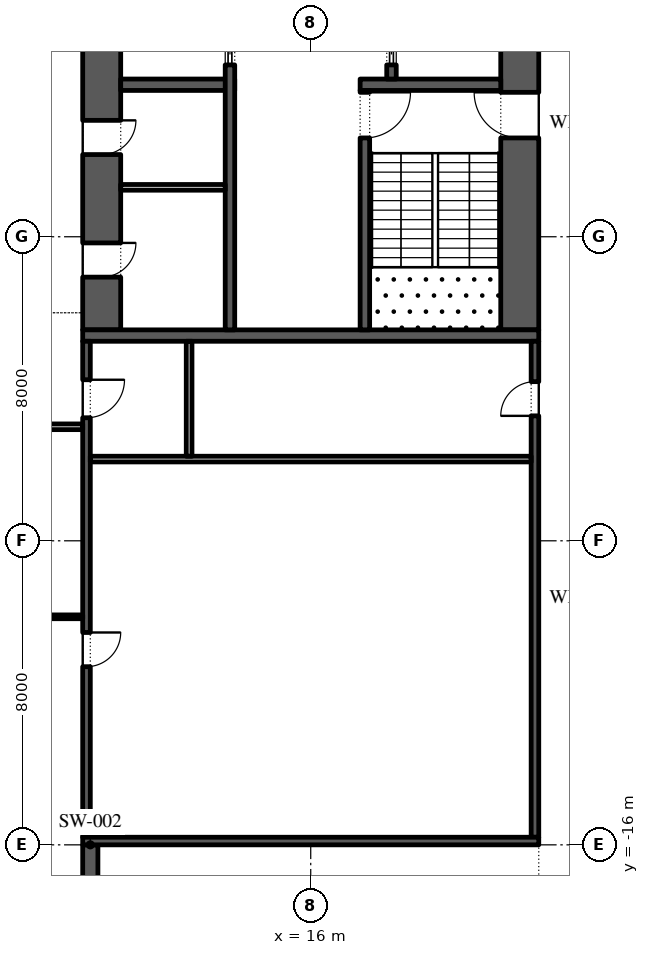
"""IFC4 building model, lengths in metres.
Left out: names, types, materials, properties, quantities, classifications, styles, units other than length and angle.
Written with IfcOpenShell. Run it as: python <this file> out.ifc"""

import sys

from ifc_helpers import new_model, si_unit, direction, frame, frame_2d, origin, place, context, subcontext, project, spatial, rectangle, extrude, element, fill, save


model = new_model("IFC4")
c1 = context("Model", 3, precision=1e-05, world=origin(), true_north=direction((0.0, 1.0)))
c2 = subcontext(c1, "Body", "Model", "MODEL_VIEW")
j1 = project(units=[si_unit("LENGTHUNIT", "METRE"), si_unit("PLANEANGLEUNIT", "RADIAN")], contexts=[c1])
p1 = place(None, origin())
s1 = spatial("IfcSite", under=j1, at=p1, CompositionType="ELEMENT")
p2 = place(p1, origin())
s2 = spatial("IfcBuilding", under=s1, at=p2, CompositionType="ELEMENT")
p3 = place(p2, frame((0.0, 0.0, 19.2)))
s3 = spatial("IfcBuildingStorey", under=s2, at=p3, CompositionType="ELEMENT", Elevation=19.2)
p4 = place(p3, frame((10.2, -31.0, 0.0), z_axis=(0.0, 0.0, 1.0), x_axis=(0.0, 1.0, 0.0)))
e1 = element("IfcWall", 1, at=p4, inside=s3, PredefinedType="SHEAR", context=c2, shape_type="SweptSolid", body=[
    extrude(rectangle(XDim=15.0, YDim=0.4, at=frame_2d((7.5, 0.0))), origin(), (0.0, 0.0, 1.0), 4.5),
])
p5 = place(p3, frame((21.5, -2.45, 0.0), z_axis=(0.0, 0.0, 1.0), x_axis=(0.0, 1.0, 0.0)))
e2 = element("IfcWall", 2, at=p5, inside=s3, PredefinedType="SHEAR", context=c2, shape_type="SweptSolid", body=[
    extrude(rectangle(XDim=27.9, YDim=1.0, at=frame_2d((13.95, 0.0))), origin(), (0.0, 0.0, 1.0), 4.5),
])
p6 = place(p5, frame((5.05, 0.0, 0.0)))
e3 = element("IfcOpeningElement", 3, at=p6, cuts=e2, PredefinedType="OPENING", context=c2, shape_type="SweptSolid", body=[
    extrude(rectangle(XDim=1.2, YDim=2.1, at=frame_2d((0.6, 1.05))), frame((0.0, 0.51, 0.0), z_axis=(0.0, -1.0, 0.0), x_axis=(1.0, 0.0, 0.0)), (0.0, 0.0, 1.0), 1.02),
])
p7 = place(p5, frame((21.65, 0.0, 0.0)))
e4 = element("IfcOpeningElement", 4, at=p7, cuts=e2, PredefinedType="OPENING", context=c2, shape_type="SweptSolid", body=[
    extrude(rectangle(XDim=1.2, YDim=2.1, at=frame_2d((0.6, 1.05))), frame((0.0, 0.51, 0.0), z_axis=(0.0, -1.0, 0.0), x_axis=(1.0, 0.0, 0.0)), (0.0, 0.0, 1.0), 1.02),
])
p8 = place(p3, frame((10.5, -2.45, 0.0), z_axis=(0.0, 0.0, 1.0), x_axis=(0.0, 1.0, 0.0)))
e5 = element("IfcWall", 5, at=p8, inside=s3, PredefinedType="SHEAR", context=c2, shape_type="SweptSolid", body=[
    extrude(rectangle(XDim=27.9, YDim=1.0, at=frame_2d((13.95, 0.0))), origin(), (0.0, 0.0, 1.0), 4.5),
])
p9 = place(p8, frame((23.65, 0.0, 0.0)))
e6 = element("IfcOpeningElement", 6, at=p9, cuts=e5, PredefinedType="OPENING", context=c2, shape_type="SweptSolid", body=[
    extrude(rectangle(XDim=2.4, YDim=2.1, at=frame_2d((1.2, 1.05))), frame((0.0, 0.51, 0.0), z_axis=(0.0, -1.0, 0.0), x_axis=(1.0, 0.0, 0.0)), (0.0, 0.0, 1.0), 1.02),
])
p10 = place(p8, frame((1.387, 0.0, 0.0)))
e7 = element("IfcOpeningElement", 7, at=p10, cuts=e5, PredefinedType="OPENING", context=c2, shape_type="SweptSolid", body=[
    extrude(rectangle(XDim=0.9, YDim=2.1, at=frame_2d((0.45, 1.05))), frame((0.0, 0.51, 0.0), z_axis=(0.0, -1.0, 0.0), x_axis=(1.0, 0.0, 0.0)), (0.0, 0.0, 1.0), 1.02),
])
p11 = place(p8, frame((4.613, 0.0, 0.0)))
e8 = element("IfcOpeningElement", 8, at=p11, cuts=e5, PredefinedType="OPENING", context=c2, shape_type="SweptSolid", body=[
    extrude(rectangle(XDim=0.9, YDim=2.1, at=frame_2d((0.45, 1.05))), frame((0.0, 0.51, 0.0), z_axis=(0.0, -1.0, 0.0), x_axis=(1.0, 0.0, 0.0)), (0.0, 0.0, 1.0), 1.02),
])
p12 = place(p3, frame((10.0, -2.6, 0.0), z_axis=(0.0, 0.0, 1.0), x_axis=(1.0, 0.0, 0.0)))
e9 = element("IfcWall", 9, at=p12, inside=s3, PredefinedType="SHEAR", context=c2, shape_type="SweptSolid", body=[
    extrude(rectangle(XDim=12.0, YDim=0.3, at=frame_2d((6.0, 0.0))), origin(), (0.0, 0.0, 1.0), 4.5),
])
p13 = place(p3, frame((17.3, 4.0, 0.0), z_axis=(0.0, 0.0, 1.0), x_axis=(1.0, 0.0, 0.0)))
e10 = element("IfcWall", 10, at=p13, inside=s3, PredefinedType="SHEAR", context=c2, shape_type="SweptSolid", body=[
    extrude(rectangle(XDim=3.7, YDim=0.3, at=frame_2d((1.85, 0.0))), origin(), (0.0, 0.0, 1.0), 4.5),
])
p14 = place(p3, frame((17.425, -2.45, 0.0), z_axis=(0.0, 0.0, 1.0), x_axis=(0.0, 1.0, 0.0)))
e11 = element("IfcWall", 11, at=p14, inside=s3, PredefinedType="SHEAR", context=c2, shape_type="SweptSolid", body=[
    extrude(rectangle(XDim=6.3, YDim=0.25, at=frame_2d((3.15, 0.0))), origin(), (0.0, 0.0, 1.0), 4.5),
])
p15 = place(p14, frame((5.05, 0.0, 0.0)))
e12 = element("IfcOpeningElement", 12, at=p15, cuts=e11, PredefinedType="OPENING", context=c2, shape_type="SweptSolid", body=[
    extrude(rectangle(XDim=1.2, YDim=2.1, at=frame_2d((0.6, 1.05))), frame((0.0, 0.135, 0.0), z_axis=(0.0, -1.0, 0.0), x_axis=(1.0, 0.0, 0.0)), (0.0, 0.0, 1.0), 0.27),
])
p16 = place(p3, frame((18.125, 4.15, 0.0), z_axis=(0.0, 0.0, 1.0), x_axis=(0.0, 1.0, 0.0)))
e13 = element("IfcWall", 13, at=p16, inside=s3, PredefinedType="SHEAR", context=c2, shape_type="SweptSolid", body=[
    extrude(rectangle(XDim=14.7, YDim=0.25, at=frame_2d((7.35, 0.0))), origin(), (0.0, 0.0, 1.0), 4.5),
])
p17 = place(p16, frame((0.371, 0.0, 0.0)))
e14 = element("IfcOpeningElement", 14, at=p17, cuts=e13, PredefinedType="OPENING", context=c2, shape_type="SweptSolid", body=[
    extrude(rectangle(XDim=1.1, YDim=2.1, at=frame_2d((0.55, 1.05))), frame((0.0, 0.135, 0.0), z_axis=(0.0, -1.0, 0.0), x_axis=(1.0, 0.0, 0.0)), (0.0, 0.0, 1.0), 0.27),
])
p18 = place(p16, frame((2.514, 0.0, 0.0)))
e15 = element("IfcOpeningElement", 15, at=p18, cuts=e13, PredefinedType="OPENING", context=c2, shape_type="SweptSolid", body=[
    extrude(rectangle(XDim=1.1, YDim=2.1, at=frame_2d((0.55, 1.05))), frame((0.0, 0.135, 0.0), z_axis=(0.0, -1.0, 0.0), x_axis=(1.0, 0.0, 0.0)), (0.0, 0.0, 1.0), 0.27),
])
p19 = place(p16, frame((4.657, 0.0, 0.0)))
e16 = element("IfcOpeningElement", 16, at=p19, cuts=e13, PredefinedType="OPENING", context=c2, shape_type="SweptSolid", body=[
    extrude(rectangle(XDim=1.1, YDim=2.1, at=frame_2d((0.55, 1.05))), frame((0.0, 0.135, 0.0), z_axis=(0.0, -1.0, 0.0), x_axis=(1.0, 0.0, 0.0)), (0.0, 0.0, 1.0), 0.27),
])
p20 = place(p16, frame((6.8, 0.0, 0.0)))
e17 = element("IfcOpeningElement", 17, at=p20, cuts=e13, PredefinedType="OPENING", context=c2, shape_type="SweptSolid", body=[
    extrude(rectangle(XDim=1.1, YDim=2.1, at=frame_2d((0.55, 1.05))), frame((0.0, 0.135, 0.0), z_axis=(0.0, -1.0, 0.0), x_axis=(1.0, 0.0, 0.0)), (0.0, 0.0, 1.0), 0.27),
])
p21 = place(p16, frame((8.943, 0.0, 0.0)))
e18 = element("IfcOpeningElement", 18, at=p21, cuts=e13, PredefinedType="OPENING", context=c2, shape_type="SweptSolid", body=[
    extrude(rectangle(XDim=1.1, YDim=2.1, at=frame_2d((0.55, 1.05))), frame((0.0, 0.135, 0.0), z_axis=(0.0, -1.0, 0.0), x_axis=(1.0, 0.0, 0.0)), (0.0, 0.0, 1.0), 0.27),
])
p22 = place(p16, frame((11.086, 0.0, 0.0)))
e19 = element("IfcOpeningElement", 19, at=p22, cuts=e13, PredefinedType="OPENING", context=c2, shape_type="SweptSolid", body=[
    extrude(rectangle(XDim=1.1, YDim=2.1, at=frame_2d((0.55, 1.05))), frame((0.0, 0.135, 0.0), z_axis=(0.0, -1.0, 0.0), x_axis=(1.0, 0.0, 0.0)), (0.0, 0.0, 1.0), 0.27),
])
p23 = place(p16, frame((13.229, 0.0, 0.0)))
e20 = element("IfcOpeningElement", 20, at=p23, cuts=e13, PredefinedType="OPENING", context=c2, shape_type="SweptSolid", body=[
    extrude(rectangle(XDim=1.1, YDim=2.1, at=frame_2d((0.55, 1.05))), frame((0.0, 0.135, 0.0), z_axis=(0.0, -1.0, 0.0), x_axis=(1.0, 0.0, 0.0)), (0.0, 0.0, 1.0), 0.27),
])
p24 = place(p3, frame((11.0, 4.0, 0.0), z_axis=(0.0, 0.0, 1.0), x_axis=(1.0, 0.0, 0.0)))
e21 = element("IfcWall", 21, at=p24, inside=s3, PredefinedType="SHEAR", context=c2, shape_type="SweptSolid", body=[
    extrude(rectangle(XDim=3.0, YDim=0.3, at=frame_2d((1.5, 0.0))), origin(), (0.0, 0.0, 1.0), 4.5),
])
p25 = place(p3, frame((13.875, -2.45, 0.0), z_axis=(0.0, 0.0, 1.0), x_axis=(0.0, 1.0, 0.0)))
e22 = element("IfcWall", 22, at=p25, inside=s3, PredefinedType="SHEAR", context=c2, shape_type="SweptSolid", body=[
    extrude(rectangle(XDim=21.3, YDim=0.25, at=frame_2d((10.65, 0.0))), origin(), (0.0, 0.0, 1.0), 4.5),
])
p26 = place(p25, frame((11.446, 0.0, 0.0)))
e23 = element("IfcOpeningElement", 23, at=p26, cuts=e22, PredefinedType="OPENING", context=c2, shape_type="SweptSolid", body=[
    extrude(rectangle(XDim=0.9, YDim=2.1, at=frame_2d((0.45, 1.05))), frame((0.0, 0.135, 0.0), z_axis=(0.0, -1.0, 0.0), x_axis=(1.0, 0.0, 0.0)), (0.0, 0.0, 1.0), 0.27),
])
p27 = place(p25, frame((17.725, 0.0, 0.0)))
e24 = element("IfcOpeningElement", 24, at=p27, cuts=e22, PredefinedType="OPENING", context=c2, shape_type="SweptSolid", body=[
    extrude(rectangle(XDim=0.9, YDim=2.1, at=frame_2d((0.45, 1.05))), frame((0.0, 0.135, 0.0), z_axis=(0.0, -1.0, 0.0), x_axis=(1.0, 0.0, 0.0)), (0.0, 0.0, 1.0), 0.27),
])
p28 = place(p25, frame((6.971, 0.0, 0.0)))
e25 = element("IfcOpeningElement", 25, at=p28, cuts=e22, PredefinedType="OPENING", context=c2, shape_type="SweptSolid", body=[
    extrude(rectangle(XDim=1.1, YDim=2.1, at=frame_2d((0.55, 1.05))), frame((0.0, 0.135, 0.0), z_axis=(0.0, -1.0, 0.0), x_axis=(1.0, 0.0, 0.0)), (0.0, 0.0, 1.0), 0.27),
])
p29 = place(p3, frame((11.0, 1.3, 0.0), z_axis=(0.0, 0.0, 1.0), x_axis=(1.0, 0.0, 0.0)))
e26 = element("IfcWall", 26, at=p29, inside=s3, PredefinedType="PARTITIONING", context=c2, shape_type="SweptSolid", body=[
    extrude(rectangle(XDim=2.75, YDim=0.15, at=frame_2d((1.375, 0.0))), origin(), (0.0, 0.0, 1.0), 4.5),
])
p30 = place(p3, frame((21.9, -15.8, 0.0), z_axis=(0.0, 0.0, 1.0), x_axis=(0.0, 1.0, 0.0)))
e27 = element("IfcWall", 27, at=p30, inside=s3, PredefinedType="SHEAR", context=c2, shape_type="SweptSolid", body=[
    extrude(rectangle(XDim=13.05, YDim=0.2, at=frame_2d((6.525, 0.0))), origin(), (0.0, 0.0, 1.0), 4.5),
])
p31 = place(p30, frame((11.087, 0.0, 0.0)))
e28 = element("IfcOpeningElement", 28, at=p31, cuts=e27, PredefinedType="OPENING", context=c2, shape_type="SweptSolid", body=[
    extrude(rectangle(XDim=0.9, YDim=2.1, at=frame_2d((0.45, 1.05))), frame((0.0, 0.11, 0.0), z_axis=(0.0, -1.0, 0.0), x_axis=(1.0, 0.0, 0.0)), (0.0, 0.0, 1.0), 0.22),
])
p32 = place(p3, frame((10.1, -15.8, 0.0), z_axis=(0.0, 0.0, 1.0), x_axis=(0.0, 1.0, 0.0)))
e29 = element("IfcWall", 29, at=p32, inside=s3, PredefinedType="SHEAR", context=c2, shape_type="SweptSolid", body=[
    extrude(rectangle(XDim=13.05, YDim=0.2, at=frame_2d((6.525, 0.0))), origin(), (0.0, 0.0, 1.0), 4.5),
])
p33 = place(p32, frame((4.488, 0.0, 0.0)))
e30 = element("IfcOpeningElement", 30, at=p33, cuts=e29, PredefinedType="OPENING", context=c2, shape_type="SweptSolid", body=[
    extrude(rectangle(XDim=0.9, YDim=2.1, at=frame_2d((0.45, 1.05))), frame((0.0, 0.11, 0.0), z_axis=(0.0, -1.0, 0.0), x_axis=(1.0, 0.0, 0.0)), (0.0, 0.0, 1.0), 0.22),
])
p34 = place(p32, frame((11.038, 0.0, 0.0)))
e31 = element("IfcOpeningElement", 31, at=p34, cuts=e29, PredefinedType="OPENING", context=c2, shape_type="SweptSolid", body=[
    extrude(rectangle(XDim=1.0, YDim=2.1, at=frame_2d((0.5, 1.05))), frame((0.0, 0.11, 0.0), z_axis=(0.0, -1.0, 0.0), x_axis=(1.0, 0.0, 0.0)), (0.0, 0.0, 1.0), 0.22),
])
p35 = place(p3, frame((10.0, -15.9, 0.0), z_axis=(0.0, 0.0, 1.0), x_axis=(1.0, 0.0, 0.0)))
e32 = element("IfcWall", 32, at=p35, inside=s3, PredefinedType="SHEAR", context=c2, shape_type="SweptSolid", body=[
    extrude(rectangle(XDim=12.0, YDim=0.2, at=frame_2d((6.0, 0.0))), origin(), (0.0, 0.0, 1.0), 4.5),
])
p36 = place(p3, frame((10.2, -5.85, 0.0), z_axis=(0.0, 0.0, 1.0), x_axis=(1.0, 0.0, 0.0)))
e33 = element("IfcWall", 33, at=p36, inside=s3, PredefinedType="PARTITIONING", context=c2, shape_type="SweptSolid", body=[
    extrude(rectangle(XDim=11.6, YDim=0.15, at=frame_2d((5.8, 0.0))), origin(), (0.0, 0.0, 1.0), 4.5),
])
p37 = place(p3, frame((12.8, -5.775, 0.0), z_axis=(0.0, 0.0, 1.0), x_axis=(0.0, 1.0, 0.0)))
e34 = element("IfcWall", 34, at=p37, inside=s3, PredefinedType="PARTITIONING", context=c2, shape_type="SweptSolid", body=[
    extrude(rectangle(XDim=3.025, YDim=0.15, at=frame_2d((1.512, 0.0))), origin(), (0.0, 0.0, 1.0), 4.5),
])
p38 = place(p3, frame((2.075, -10.0, 0.0), z_axis=(0.0, 0.0, 1.0), x_axis=(1.0, 0.0, 0.0)))
e35 = element("IfcWall", 35, at=p38, inside=s3, PredefinedType="PARTITIONING", context=c2, shape_type="SweptSolid", body=[
    extrude(rectangle(XDim=7.925, YDim=0.1, at=frame_2d((3.962, 0.0))), origin(), (0.0, 0.0, 1.0), 4.5),
])
p39 = place(p3, frame((2.075, -5.0, 0.0), z_axis=(0.0, 0.0, 1.0), x_axis=(1.0, 0.0, 0.0)))
e36 = element("IfcWall", 36, at=p39, inside=s3, PredefinedType="PARTITIONING", context=c2, shape_type="SweptSolid", body=[
    extrude(rectangle(XDim=7.925, YDim=0.15, at=frame_2d((3.962, 0.0))), origin(), (0.0, 0.0, 1.0), 4.5),
])
p40 = place(p39, frame((3.462, 0.0, 0.0)))
e37 = element("IfcOpeningElement", 37, at=p40, cuts=e36, PredefinedType="OPENING", context=c2, shape_type="SweptSolid", body=[
    extrude(rectangle(XDim=1.0, YDim=2.1, at=frame_2d((0.5, 1.05))), frame((0.0, 0.085, 0.0), z_axis=(0.0, -1.0, 0.0), x_axis=(1.0, 0.0, 0.0)), (0.0, 0.0, 1.0), 0.17),
])
p41 = place(p17, origin())
e38 = element("IfcDoor", 38, at=p41, inside=s3, OperationType="SLIDING_TO_LEFT", PredefinedType="DOOR", context=c2, shape_type="SweptSolid", body=[
    extrude(rectangle(XDim=1.1, YDim=2.1, at=frame_2d((0.55, 1.05))), frame((0.0, 0.025, 0.0), z_axis=(0.0, -1.0, 0.0), x_axis=(1.0, 0.0, 0.0)), (0.0, 0.0, 1.0), 0.05),
])
fill(e14, e38)
p42 = place(p28, origin())
e39 = element("IfcDoor", 39, at=p42, inside=s3, OperationType="SLIDING_TO_LEFT", PredefinedType="DOOR", context=c2, shape_type="SweptSolid", body=[
    extrude(rectangle(XDim=1.1, YDim=2.1, at=frame_2d((0.55, 1.05))), frame((0.0, 0.025, 0.0), z_axis=(0.0, -1.0, 0.0), x_axis=(1.0, 0.0, 0.0)), (0.0, 0.0, 1.0), 0.05),
])
fill(e25, e39)
p43 = place(p15, frame((1.2, 0.0, 0.0), z_axis=(0.0, 0.0, 1.0), x_axis=(-1.0, 0.0, 0.0)))
e40 = element("IfcDoor", 40, at=p43, inside=s3, OperationType="SINGLE_SWING_RIGHT", PredefinedType="DOOR", context=c2, shape_type="SweptSolid", body=[
    extrude(rectangle(XDim=1.2, YDim=2.1, at=frame_2d((0.6, 1.05))), frame((0.0, 0.025, 0.0), z_axis=(0.0, -1.0, 0.0), x_axis=(1.0, 0.0, 0.0)), (0.0, 0.0, 1.0), 0.05),
])
fill(e12, e40)
p44 = place(p6, origin())
e41 = element("IfcDoor", 41, at=p44, inside=s3, OperationType="SINGLE_SWING_LEFT", PredefinedType="DOOR", context=c2, shape_type="SweptSolid", body=[
    extrude(rectangle(XDim=1.2, YDim=2.1, at=frame_2d((0.6, 1.05))), frame((0.0, 0.025, 0.0), z_axis=(0.0, -1.0, 0.0), x_axis=(1.0, 0.0, 0.0)), (0.0, 0.0, 1.0), 0.05),
])
fill(e3, e41)
p45 = place(p10, frame((0.9, -0.95, 0.0), z_axis=(0.0, 0.0, 1.0), x_axis=(-1.0, 0.0, 0.0)))
e42 = element("IfcDoor", 42, at=p45, inside=s3, OperationType="SINGLE_SWING_RIGHT", PredefinedType="DOOR", context=c2, shape_type="SweptSolid", body=[
    extrude(rectangle(XDim=0.9, YDim=2.1, at=frame_2d((0.45, 1.05))), frame((0.0, -0.45, 0.0), z_axis=(0.0, -1.0, 0.0), x_axis=(1.0, 0.0, 0.0)), (0.0, 0.0, 1.0), 0.05),
])
fill(e7, e42)
p46 = place(p11, frame((0.9, -0.95, 0.0), z_axis=(0.0, 0.0, 1.0), x_axis=(-1.0, 0.0, 0.0)))
e43 = element("IfcDoor", 43, at=p46, inside=s3, OperationType="SINGLE_SWING_RIGHT", PredefinedType="DOOR", context=c2, shape_type="SweptSolid", body=[
    extrude(rectangle(XDim=0.9, YDim=2.1, at=frame_2d((0.45, 1.05))), frame((0.0, -0.45, 0.0), z_axis=(0.0, -1.0, 0.0), x_axis=(1.0, 0.0, 0.0)), (0.0, 0.0, 1.0), 0.05),
])
fill(e8, e43)
p47 = place(p33, frame((0.9, -0.15, 0.0), z_axis=(0.0, 0.0, 1.0), x_axis=(-1.0, 0.0, 0.0)))
e44 = element("IfcDoor", 44, at=p47, inside=s3, OperationType="SINGLE_SWING_RIGHT", PredefinedType="DOOR", context=c2, shape_type="SweptSolid", body=[
    extrude(rectangle(XDim=0.9, YDim=2.1, at=frame_2d((0.45, 1.05))), frame((0.0, -0.05, 0.0), z_axis=(0.0, -1.0, 0.0), x_axis=(1.0, 0.0, 0.0)), (0.0, 0.0, 1.0), 0.05),
])
fill(e30, e44)
p48 = place(p34, frame((1.0, -0.15, 0.0), z_axis=(0.0, 0.0, 1.0), x_axis=(-1.0, 0.0, 0.0)))
e45 = element("IfcDoor", 45, at=p48, inside=s3, OperationType="SINGLE_SWING_RIGHT", PredefinedType="DOOR", context=c2, shape_type="SweptSolid", body=[
    extrude(rectangle(XDim=1.0, YDim=2.1, at=frame_2d((0.5, 1.05))), frame((0.0, -0.05, 0.0), z_axis=(0.0, -1.0, 0.0), x_axis=(1.0, 0.0, 0.0)), (0.0, 0.0, 1.0), 0.05),
])
fill(e31, e45)
p49 = place(p31, origin())
e46 = element("IfcDoor", 46, at=p49, inside=s3, OperationType="SINGLE_SWING_RIGHT", PredefinedType="DOOR", context=c2, shape_type="SweptSolid", body=[
    extrude(rectangle(XDim=0.9, YDim=2.1, at=frame_2d((0.45, 1.05))), frame((0.0, 0.1, 0.0), z_axis=(0.0, -1.0, 0.0), x_axis=(1.0, 0.0, 0.0)), (0.0, 0.0, 1.0), 0.05),
])
fill(e28, e46)
save(model, sys.argv[1])
